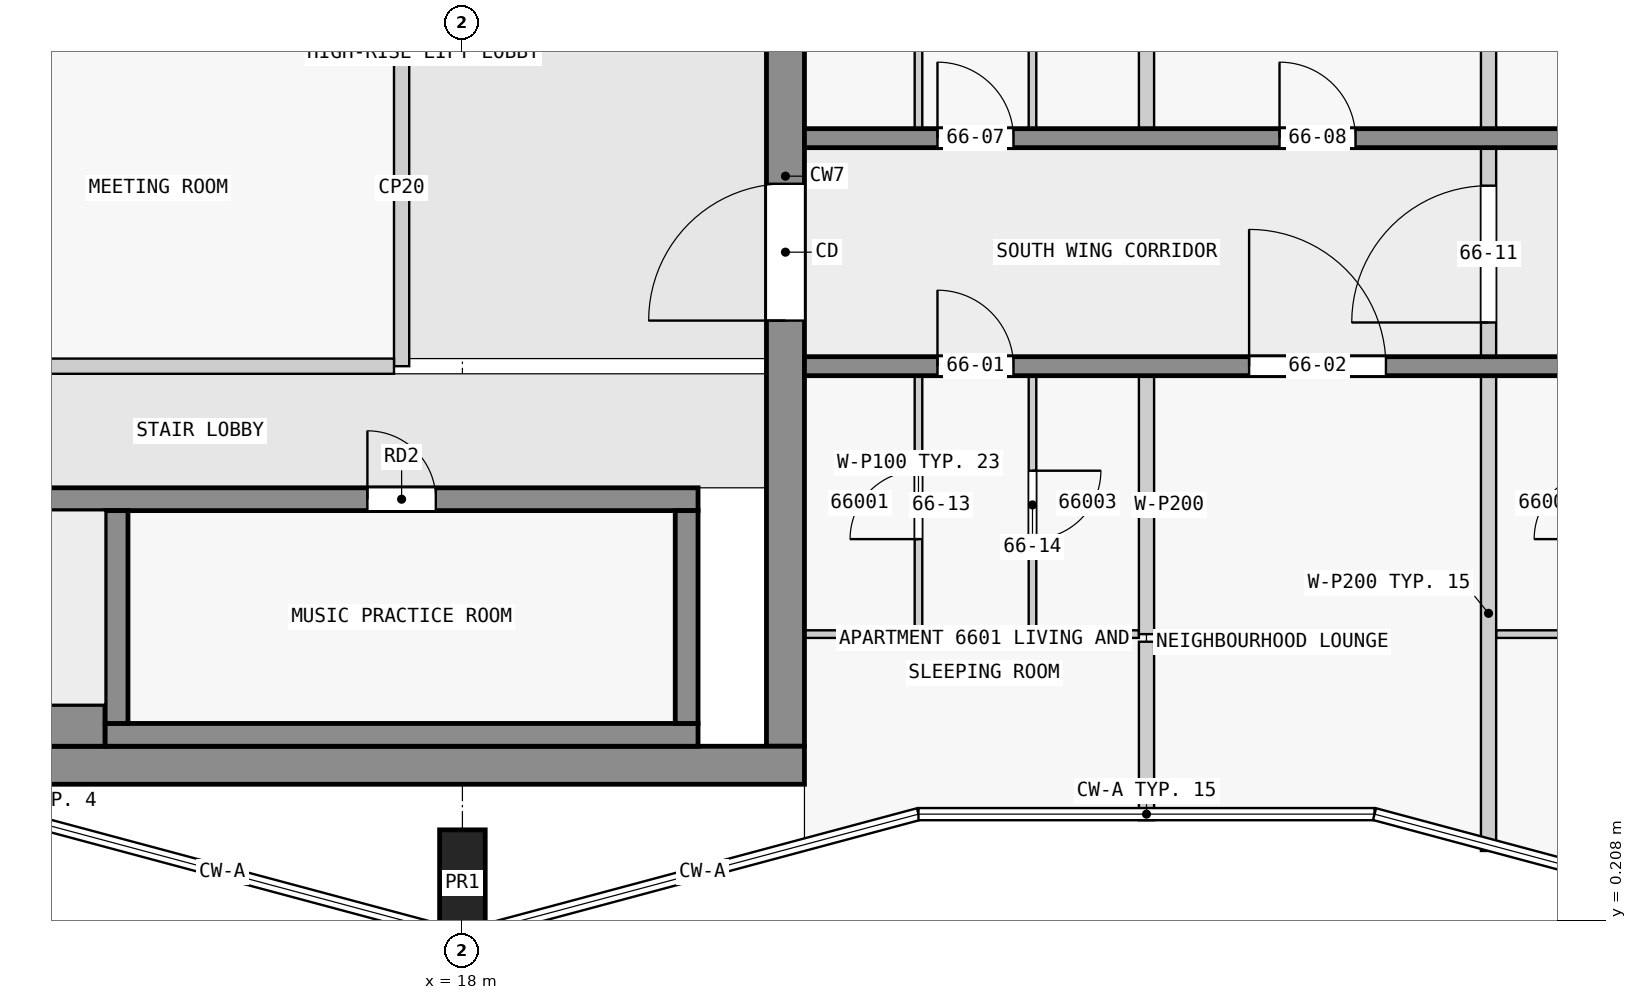
"""IFC4 building model, lengths in metres.
Left out: names, types, materials, properties, quantities, classifications, styles, units other than length and angle.
Written with IfcOpenShell. Run it as: python <this file> out.ifc"""

import sys

from ifc_helpers import new_model, si_unit, direction, frame, frame_2d, origin, origin_2d, place, context, subcontext, project, spatial, rectangle, extrude, element, fill, save


model = new_model("IFC4")
c1 = context("Model", 3, precision=1e-05, world=origin(), true_north=direction((0.0, 1.0)))
c2 = subcontext(c1, "Body", "Model", "MODEL_VIEW")
j1 = project(units=[si_unit("LENGTHUNIT", "METRE"), si_unit("PLANEANGLEUNIT", "RADIAN")], contexts=[c1])
p1 = place(None, origin())
s1 = spatial("IfcSite", under=j1, at=p1, CompositionType="ELEMENT")
p2 = place(p1, origin())
s2 = spatial("IfcBuilding", under=s1, at=p2, CompositionType="ELEMENT")
p3 = place(p2, frame((0.0, 0.0, 252.9)))
s3 = spatial("IfcBuildingStorey", under=s2, at=p3, CompositionType="ELEMENT", Elevation=252.9)
p4 = place(p3, frame((18.0, 0.7, 0.0), z_axis=(0.0, 0.0, 1.0), x_axis=(1.0, 0.0, 0.0)))
e1 = element("IfcColumn", 1, at=p4, inside=s3, PredefinedType="COLUMN", context=c2, shape_type="SweptSolid", body=[
    extrude(rectangle(XDim=0.6, YDim=1.4, at=origin_2d()), origin(), (0.0, 0.0, 1.0), 3.5),
])
p5 = place(p3, frame((1.8, 2.25, 0.0), z_axis=(0.0, 0.0, 1.0), x_axis=(1.0, 0.0, 0.0)))
e2 = element("IfcWall", 2, at=p5, inside=s3, PredefinedType="SHEAR", context=c2, shape_type="SweptSolid", body=[
    extrude(rectangle(XDim=20.7, YDim=0.5, at=frame_2d((10.35, 0.0))), origin(), (0.0, 0.0, 1.0), 3.25),
])
p6 = place(p3, frame((22.25, 2.5, 0.0), z_axis=(0.0, 0.0, 1.0), x_axis=(0.0, 1.0, 0.0)))
e3 = element("IfcWall", 3, at=p6, inside=s3, PredefinedType="SHEAR", context=c2, shape_type="SweptSolid", body=[
    extrude(rectangle(XDim=15.0, YDim=0.5, at=frame_2d((7.5, 0.0))), origin(), (0.0, 0.0, 1.0), 3.25),
])
p7 = place(p6, frame((5.6, 0.0, 0.0)))
e4 = element("IfcOpeningElement", 4, at=p7, cuts=e3, PredefinedType="OPENING", context=c2, shape_type="SweptSolid", body=[
    extrude(rectangle(XDim=1.8, YDim=2.1, at=frame_2d((0.9, 1.05))), frame((0.0, 0.26, 0.0), z_axis=(0.0, -1.0, 0.0), x_axis=(1.0, 0.0, 0.0)), (0.0, 0.0, 1.0), 0.52),
])
p8 = place(p3, frame((6.9, 2.775, 0.0), z_axis=(0.0, 0.0, 1.0), x_axis=(1.0, 0.0, 0.0)))
e5 = element("IfcWall", 5, at=p8, inside=s3, PredefinedType="SHEAR", context=c2, shape_type="SweptSolid", body=[
    extrude(rectangle(XDim=6.4, YDim=0.55, at=frame_2d((3.2, 0.0))), origin(), (0.0, 0.0, 1.0), 3.25),
])
p9 = place(p3, frame((13.3, 2.65, 0.0), z_axis=(0.0, 0.0, 1.0), x_axis=(1.0, 0.0, 0.0)))
e6 = element("IfcWall", 6, at=p9, inside=s3, PredefinedType="SHEAR", context=c2, shape_type="SweptSolid", body=[
    extrude(rectangle(XDim=7.8, YDim=0.3, at=frame_2d((3.9, 0.0))), origin(), (0.0, 0.0, 1.0), 3.25),
])
for number, where, z_axis, x_axis in (
    (7, (13.45, 2.8, 0.0), (0.0, 0.0, 1.0), (0.0, 1.0, 0.0)),
    (8, (20.95, 2.8, 0.0), (0.0, 0.0, 1.0), (0.0, 1.0, 0.0)),
):
    element("IfcWall", number, at=place(p3, frame(where, z_axis=z_axis, x_axis=x_axis)), inside=s3, PredefinedType="SHEAR", context=c2, shape_type="SweptSolid", body=[
        extrude(rectangle(XDim=2.8, YDim=0.3, at=frame_2d((1.4, 0.0))), origin(), (0.0, 0.0, 1.0), 3.25),
    ])
p10 = place(p3, frame((2.3, 5.75, 0.0), z_axis=(0.0, 0.0, 1.0), x_axis=(1.0, 0.0, 0.0)))
e9 = element("IfcWall", 9, at=p10, inside=s3, PredefinedType="SHEAR", context=c2, shape_type="SweptSolid", body=[
    extrude(rectangle(XDim=18.8, YDim=0.3, at=frame_2d((9.4, 0.0))), origin(), (0.0, 0.0, 1.0), 3.25),
])
p11 = place(p10, frame((4.65, 0.0, 0.0)))
e10 = element("IfcOpeningElement", 10, at=p11, cuts=e9, PredefinedType="OPENING", context=c2, shape_type="SweptSolid", body=[
    extrude(rectangle(XDim=1.1, YDim=2.1, at=frame_2d((0.55, 1.05))), frame((0.0, 0.16, 0.0), z_axis=(0.0, -1.0, 0.0), x_axis=(1.0, 0.0, 0.0)), (0.0, 0.0, 1.0), 0.32),
])
p12 = place(p10, frame((0.45, 0.0, 0.0)))
e11 = element("IfcOpeningElement", 11, at=p12, cuts=e9, PredefinedType="OPENING", context=c2, shape_type="SweptSolid", body=[
    extrude(rectangle(XDim=1.1, YDim=2.1, at=frame_2d((0.55, 1.05))), frame((0.0, 0.16, 0.0), z_axis=(0.0, -1.0, 0.0), x_axis=(1.0, 0.0, 0.0)), (0.0, 0.0, 1.0), 0.32),
])
p13 = place(p10, frame((2.75, 0.0, 0.0)))
e12 = element("IfcOpeningElement", 12, at=p13, cuts=e9, PredefinedType="OPENING", context=c2, shape_type="SweptSolid", body=[
    extrude(rectangle(XDim=1.1, YDim=2.1, at=frame_2d((0.55, 1.05))), frame((0.0, 0.16, 0.0), z_axis=(0.0, -1.0, 0.0), x_axis=(1.0, 0.0, 0.0)), (0.0, 0.0, 1.0), 0.32),
])
p14 = place(p10, frame((14.45, 0.0, 0.0)))
e13 = element("IfcOpeningElement", 13, at=p14, cuts=e9, PredefinedType="OPENING", context=c2, shape_type="SweptSolid", body=[
    extrude(rectangle(XDim=0.9, YDim=2.1, at=frame_2d((0.45, 1.05))), frame((0.0, 0.16, 0.0), z_axis=(0.0, -1.0, 0.0), x_axis=(1.0, 0.0, 0.0)), (0.0, 0.0, 1.0), 0.32),
])
p15 = place(p3, frame((22.5, 7.5, 0.0), z_axis=(0.0, 0.0, 1.0), x_axis=(1.0, 0.0, 0.0)))
e14 = element("IfcWall", 14, at=p15, inside=s3, PredefinedType="SHEAR", context=c2, shape_type="SweptSolid", body=[
    extrude(rectangle(XDim=22.5, YDim=0.25, at=frame_2d((11.25, 0.0))), origin(), (0.0, 0.0, 1.0), 3.25),
])
p16 = place(p15, frame((1.75, 0.0, 0.0)))
e15 = element("IfcOpeningElement", 15, at=p16, cuts=e14, PredefinedType="OPENING", context=c2, shape_type="SweptSolid", body=[
    extrude(rectangle(XDim=1.0, YDim=2.1, at=frame_2d((0.5, 1.05))), frame((0.0, 0.135, 0.0), z_axis=(0.0, -1.0, 0.0), x_axis=(1.0, 0.0, 0.0)), (0.0, 0.0, 1.0), 0.27),
])
p17 = place(p15, frame((5.85, 0.0, 0.0)))
e16 = element("IfcOpeningElement", 16, at=p17, cuts=e14, PredefinedType="OPENING", context=c2, shape_type="SweptSolid", body=[
    extrude(rectangle(XDim=1.8, YDim=2.1, at=frame_2d((0.9, 1.05))), frame((0.0, 0.135, 0.0), z_axis=(0.0, -1.0, 0.0), x_axis=(1.0, 0.0, 0.0)), (0.0, 0.0, 1.0), 0.27),
])
p18 = place(p15, frame((10.75, 0.0, 0.0)))
e17 = element("IfcOpeningElement", 17, at=p18, cuts=e14, PredefinedType="OPENING", context=c2, shape_type="SweptSolid", body=[
    extrude(rectangle(XDim=1.0, YDim=2.1, at=frame_2d((0.5, 1.05))), frame((0.0, 0.135, 0.0), z_axis=(0.0, -1.0, 0.0), x_axis=(1.0, 0.0, 0.0)), (0.0, 0.0, 1.0), 0.27),
])
p19 = place(p15, frame((15.25, 0.0, 0.0)))
e18 = element("IfcOpeningElement", 18, at=p19, cuts=e14, PredefinedType="OPENING", context=c2, shape_type="SweptSolid", body=[
    extrude(rectangle(XDim=1.0, YDim=2.1, at=frame_2d((0.5, 1.05))), frame((0.0, 0.135, 0.0), z_axis=(0.0, -1.0, 0.0), x_axis=(1.0, 0.0, 0.0)), (0.0, 0.0, 1.0), 0.27),
])
p20 = place(p15, frame((18.75, 0.0, 0.0)))
e19 = element("IfcOpeningElement", 19, at=p20, cuts=e14, PredefinedType="OPENING", context=c2, shape_type="SweptSolid", body=[
    extrude(rectangle(XDim=0.9, YDim=2.1, at=frame_2d((0.45, 1.05))), frame((0.0, 0.135, 0.0), z_axis=(0.0, -1.0, 0.0), x_axis=(1.0, 0.0, 0.0)), (0.0, 0.0, 1.0), 0.27),
])
p21 = place(p15, frame((20.95, 0.0, 0.0)))
e20 = element("IfcOpeningElement", 20, at=p21, cuts=e14, PredefinedType="OPENING", context=c2, shape_type="SweptSolid", body=[
    extrude(rectangle(XDim=1.0, YDim=2.1, at=frame_2d((0.5, 1.05))), frame((0.0, 0.135, 0.0), z_axis=(0.0, -1.0, 0.0), x_axis=(1.0, 0.0, 0.0)), (0.0, 0.0, 1.0), 0.27),
])
p22 = place(p3, frame((22.5, 10.5, 0.0), z_axis=(0.0, 0.0, 1.0), x_axis=(1.0, 0.0, 0.0)))
e21 = element("IfcWall", 21, at=p22, inside=s3, PredefinedType="SHEAR", context=c2, shape_type="SweptSolid", body=[
    extrude(rectangle(XDim=22.5, YDim=0.25, at=frame_2d((11.25, 0.0))), origin(), (0.0, 0.0, 1.0), 3.25),
])
p23 = place(p22, frame((1.75, 0.0, 0.0)))
e22 = element("IfcOpeningElement", 22, at=p23, cuts=e21, PredefinedType="OPENING", context=c2, shape_type="SweptSolid", body=[
    extrude(rectangle(XDim=1.0, YDim=2.1, at=frame_2d((0.5, 1.05))), frame((0.0, 0.135, 0.0), z_axis=(0.0, -1.0, 0.0), x_axis=(1.0, 0.0, 0.0)), (0.0, 0.0, 1.0), 0.27),
])
p24 = place(p22, frame((6.25, 0.0, 0.0)))
e23 = element("IfcOpeningElement", 23, at=p24, cuts=e21, PredefinedType="OPENING", context=c2, shape_type="SweptSolid", body=[
    extrude(rectangle(XDim=1.0, YDim=2.1, at=frame_2d((0.5, 1.05))), frame((0.0, 0.135, 0.0), z_axis=(0.0, -1.0, 0.0), x_axis=(1.0, 0.0, 0.0)), (0.0, 0.0, 1.0), 0.27),
])
p25 = place(p22, frame((10.75, 0.0, 0.0)))
e24 = element("IfcOpeningElement", 24, at=p25, cuts=e21, PredefinedType="OPENING", context=c2, shape_type="SweptSolid", body=[
    extrude(rectangle(XDim=1.0, YDim=2.1, at=frame_2d((0.5, 1.05))), frame((0.0, 0.135, 0.0), z_axis=(0.0, -1.0, 0.0), x_axis=(1.0, 0.0, 0.0)), (0.0, 0.0, 1.0), 0.27),
])
p26 = place(p22, frame((16.85, 0.0, 0.0)))
e25 = element("IfcOpeningElement", 25, at=p26, cuts=e21, PredefinedType="OPENING", context=c2, shape_type="SweptSolid", body=[
    extrude(rectangle(XDim=1.0, YDim=2.1, at=frame_2d((0.5, 1.05))), frame((0.0, 0.135, 0.0), z_axis=(0.0, -1.0, 0.0), x_axis=(1.0, 0.0, 0.0)), (0.0, 0.0, 1.0), 0.27),
])
p27 = place(p3, frame((10.9, 7.5, 0.0), z_axis=(0.0, 0.0, 1.0), x_axis=(1.0, 0.0, 0.0)))
e26 = element("IfcWall", 26, at=p27, inside=s3, PredefinedType="PARTITIONING", context=c2, shape_type="SweptSolid", body=[
    extrude(rectangle(XDim=6.2, YDim=0.2, at=frame_2d((3.1, 0.0))), origin(), (0.0, 0.0, 1.0), 3.25),
])
p28 = place(p3, frame((17.2, 7.5, 0.0), z_axis=(0.0, 0.0, 1.0), x_axis=(0.0, 1.0, 0.0)))
e27 = element("IfcWall", 27, at=p28, inside=s3, PredefinedType="PARTITIONING", context=c2, shape_type="SweptSolid", body=[
    extrude(rectangle(XDim=4.7, YDim=0.2, at=frame_2d((2.35, 0.0))), origin(), (0.0, 0.0, 1.0), 3.25),
])
p29 = place(p3, frame((22.5, 3.975, 0.0), z_axis=(0.0, 0.0, 1.0), x_axis=(1.0, 0.0, 0.0)))
e28 = element("IfcWall", 28, at=p29, inside=s3, PredefinedType="PARTITIONING", context=c2, shape_type="SweptSolid", body=[
    extrude(rectangle(XDim=1.45, YDim=0.1, at=frame_2d((0.725, 0.0))), origin(), (0.0, 0.0, 1.0), 3.25),
])
for number, where, z_axis, x_axis in (
    (29, (25.55, 3.975, 0.0), (0.0, 0.0, 1.0), (1.0, 0.0, 0.0)),
    (30, (31.6, 3.975, 0.0), (0.0, 0.0, 1.0), (1.0, 0.0, 0.0)),
):
    element("IfcWall", number, at=place(p3, frame(where, z_axis=z_axis, x_axis=x_axis)), inside=s3, PredefinedType="PARTITIONING", context=c2, shape_type="SweptSolid", body=[
        extrude(rectangle(XDim=1.35, YDim=0.1, at=frame_2d((0.675, 0.0))), origin(), (0.0, 0.0, 1.0), 3.25),
    ])
p30 = place(p3, frame((24.0, 3.975, 0.0), z_axis=(0.0, 0.0, 1.0), x_axis=(0.0, 1.0, 0.0)))
e31 = element("IfcWall", 31, at=p30, inside=s3, PredefinedType="PARTITIONING", context=c2, shape_type="SweptSolid", body=[
    extrude(rectangle(XDim=3.4, YDim=0.1, at=frame_2d((1.7, 0.0))), origin(), (0.0, 0.0, 1.0), 3.25),
])
p31 = place(p30, frame((1.25, 0.0, 0.0)))
e32 = element("IfcOpeningElement", 32, at=p31, cuts=e31, PredefinedType="OPENING", context=c2, shape_type="SweptSolid", body=[
    extrude(rectangle(XDim=0.9, YDim=2.1, at=frame_2d((0.45, 1.05))), frame((0.0, 0.06, 0.0), z_axis=(0.0, -1.0, 0.0), x_axis=(1.0, 0.0, 0.0)), (0.0, 0.0, 1.0), 0.12),
])
p32 = place(p3, frame((24.0, 10.625, 0.0), z_axis=(0.0, 0.0, 1.0), x_axis=(0.0, 1.0, 0.0)))
e33 = element("IfcWall", 33, at=p32, inside=s3, PredefinedType="PARTITIONING", context=c2, shape_type="SweptSolid", body=[
    extrude(rectangle(XDim=3.4, YDim=0.1, at=frame_2d((1.7, 0.0))), origin(), (0.0, 0.0, 1.0), 3.25),
])
p33 = place(p32, frame((1.25, 0.0, 0.0)))
e34 = element("IfcOpeningElement", 34, at=p33, cuts=e33, PredefinedType="OPENING", context=c2, shape_type="SweptSolid", body=[
    extrude(rectangle(XDim=0.9, YDim=2.1, at=frame_2d((0.45, 1.05))), frame((0.0, 0.06, 0.0), z_axis=(0.0, -1.0, 0.0), x_axis=(1.0, 0.0, 0.0)), (0.0, 0.0, 1.0), 0.12),
])
p34 = place(p3, frame((25.5, 7.375, 0.0), z_axis=(0.0, 0.0, 1.0), x_axis=(0.0, -1.0, 0.0)))
e35 = element("IfcWall", 35, at=p34, inside=s3, PredefinedType="PARTITIONING", context=c2, shape_type="SweptSolid", body=[
    extrude(rectangle(XDim=3.4, YDim=0.1, at=frame_2d((1.7, 0.0))), origin(), (0.0, 0.0, 1.0), 3.25),
])
p35 = place(p34, frame((1.25, 0.0, 0.0)))
e36 = element("IfcOpeningElement", 36, at=p35, cuts=e35, PredefinedType="OPENING", context=c2, shape_type="SweptSolid", body=[
    extrude(rectangle(XDim=0.9, YDim=2.1, at=frame_2d((0.45, 1.05))), frame((0.0, 0.06, 0.0), z_axis=(0.0, -1.0, 0.0), x_axis=(1.0, 0.0, 0.0)), (0.0, 0.0, 1.0), 0.12),
])
p36 = place(p3, frame((25.5, 14.025, 0.0), z_axis=(0.0, 0.0, 1.0), x_axis=(0.0, -1.0, 0.0)))
e37 = element("IfcWall", 37, at=p36, inside=s3, PredefinedType="PARTITIONING", context=c2, shape_type="SweptSolid", body=[
    extrude(rectangle(XDim=3.4, YDim=0.1, at=frame_2d((1.7, 0.0))), origin(), (0.0, 0.0, 1.0), 3.25),
])
p37 = place(p36, frame((1.25, 0.0, 0.0)))
e38 = element("IfcOpeningElement", 38, at=p37, cuts=e37, PredefinedType="OPENING", context=c2, shape_type="SweptSolid", body=[
    extrude(rectangle(XDim=0.9, YDim=2.1, at=frame_2d((0.45, 1.05))), frame((0.0, 0.06, 0.0), z_axis=(0.0, -1.0, 0.0), x_axis=(1.0, 0.0, 0.0)), (0.0, 0.0, 1.0), 0.12),
])
p38 = place(p3, frame((27.0, 3.875, 0.0), z_axis=(0.0, 0.0, 1.0), x_axis=(0.0, -1.0, 0.0)))
e39 = element("IfcWall", 39, at=p38, inside=s3, PredefinedType="PARTITIONING", context=c2, shape_type="SweptSolid", body=[
    extrude(rectangle(XDim=2.348, YDim=0.2, at=frame_2d((1.174, 0.0))), origin(), (0.0, 0.0, 1.0), 3.25),
])
for number, where, z_axis, x_axis in (
    (40, (27.0, 3.975, 0.0), (0.0, 0.0, 1.0), (0.0, 1.0, 0.0)),
    (41, (27.0, 10.625, 0.0), (0.0, 0.0, 1.0), (0.0, 1.0, 0.0)),
):
    element("IfcWall", number, at=place(p3, frame(where, z_axis=z_axis, x_axis=x_axis)), inside=s3, PredefinedType="PARTITIONING", context=c2, shape_type="SweptSolid", body=[
        extrude(rectangle(XDim=3.4, YDim=0.2, at=frame_2d((1.7, 0.0))), origin(), (0.0, 0.0, 1.0), 3.25),
    ])
for number, where, z_axis, x_axis in (
    (42, (31.5, 1.122, 0.0), (0.0, 0.0, 1.0), (0.0, 1.0, 0.0)),
    (43, (31.5, 10.625, 0.0), (0.0, 0.0, 1.0), (0.0, 1.0, 0.0)),
):
    element("IfcWall", number, at=place(p3, frame(where, z_axis=z_axis, x_axis=x_axis)), inside=s3, PredefinedType="PARTITIONING", context=c2, shape_type="SweptSolid", body=[
        extrude(rectangle(XDim=6.253, YDim=0.2, at=frame_2d((3.126, 0.0))), origin(), (0.0, 0.0, 1.0), 3.25),
    ])
p39 = place(p3, frame((31.5, 7.475, 0.0), z_axis=(0.0, 0.0, 1.0), x_axis=(0.0, 1.0, 0.0)))
e44 = element("IfcWall", 44, at=p39, inside=s3, PredefinedType="PARTITIONING", context=c2, shape_type="SweptSolid", body=[
    extrude(rectangle(XDim=3.05, YDim=0.2, at=frame_2d((1.525, 0.0))), origin(), (0.0, 0.0, 1.0), 3.25),
])
p40 = place(p39, frame((0.6, 0.0, 0.0)))
e45 = element("IfcOpeningElement", 45, at=p40, cuts=e44, PredefinedType="OPENING", context=c2, shape_type="SweptSolid", body=[
    extrude(rectangle(XDim=1.8, YDim=2.1, at=frame_2d((0.9, 1.05))), frame((0.0, 0.11, 0.0), z_axis=(0.0, -1.0, 0.0), x_axis=(1.0, 0.0, 0.0)), (0.0, 0.0, 1.0), 0.22),
])
p41 = place(p7, origin())
e46 = element("IfcDoor", 46, at=p41, inside=s3, OperationType="DOUBLE_DOOR_SINGLE_SWING", PredefinedType="DOOR", context=c2, shape_type="SweptSolid", body=[
    extrude(rectangle(XDim=1.8, YDim=2.1, at=frame_2d((0.9, 1.05))), frame((0.0, 0.025, 0.0), z_axis=(0.0, -1.0, 0.0), x_axis=(1.0, 0.0, 0.0)), (0.0, 0.0, 1.0), 0.05),
])
fill(e4, e46)
p42 = place(p14, origin())
e47 = element("IfcDoor", 47, at=p42, inside=s3, OperationType="SINGLE_SWING_LEFT", PredefinedType="DOOR", context=c2, shape_type="SweptSolid", body=[
    extrude(rectangle(XDim=0.9, YDim=2.1, at=frame_2d((0.45, 1.05))), frame((0.0, 0.025, 0.0), z_axis=(0.0, -1.0, 0.0), x_axis=(1.0, 0.0, 0.0)), (0.0, 0.0, 1.0), 0.05),
])
fill(e13, e47)
p43 = place(p16, origin())
e48 = element("IfcDoor", 48, at=p43, inside=s3, OperationType="SINGLE_SWING_LEFT", PredefinedType="DOOR", context=c2, shape_type="SweptSolid", body=[
    extrude(rectangle(XDim=1.0, YDim=2.1, at=frame_2d((0.5, 1.05))), frame((0.0, 0.025, 0.0), z_axis=(0.0, -1.0, 0.0), x_axis=(1.0, 0.0, 0.0)), (0.0, 0.0, 1.0), 0.05),
])
fill(e15, e48)
p44 = place(p17, origin())
e49 = element("IfcDoor", 49, at=p44, inside=s3, OperationType="SINGLE_SWING_LEFT", PredefinedType="DOOR", context=c2, shape_type="SweptSolid", body=[
    extrude(rectangle(XDim=1.8, YDim=2.1, at=frame_2d((0.9, 1.05))), frame((0.0, 0.025, 0.0), z_axis=(0.0, -1.0, 0.0), x_axis=(1.0, 0.0, 0.0)), (0.0, 0.0, 1.0), 0.05),
])
fill(e16, e49)
p45 = place(p23, origin())
e50 = element("IfcDoor", 50, at=p45, inside=s3, OperationType="SINGLE_SWING_LEFT", PredefinedType="DOOR", context=c2, shape_type="SweptSolid", body=[
    extrude(rectangle(XDim=1.0, YDim=2.1, at=frame_2d((0.5, 1.05))), frame((0.0, 0.025, 0.0), z_axis=(0.0, -1.0, 0.0), x_axis=(1.0, 0.0, 0.0)), (0.0, 0.0, 1.0), 0.05),
])
fill(e22, e50)
p46 = place(p24, origin())
e51 = element("IfcDoor", 51, at=p46, inside=s3, OperationType="SINGLE_SWING_LEFT", PredefinedType="DOOR", context=c2, shape_type="SweptSolid", body=[
    extrude(rectangle(XDim=1.0, YDim=2.1, at=frame_2d((0.5, 1.05))), frame((0.0, 0.025, 0.0), z_axis=(0.0, -1.0, 0.0), x_axis=(1.0, 0.0, 0.0)), (0.0, 0.0, 1.0), 0.05),
])
fill(e23, e51)
p47 = place(p40, origin())
e52 = element("IfcDoor", 52, at=p47, inside=s3, OperationType="SINGLE_SWING_LEFT", PredefinedType="DOOR", context=c2, shape_type="SweptSolid", body=[
    extrude(rectangle(XDim=1.8, YDim=2.1, at=frame_2d((0.9, 1.05))), frame((0.0, 0.025, 0.0), z_axis=(0.0, -1.0, 0.0), x_axis=(1.0, 0.0, 0.0)), (0.0, 0.0, 1.0), 0.05),
])
fill(e45, e52)
p48 = place(p31, origin())
e53 = element("IfcDoor", 53, at=p48, inside=s3, OperationType="SINGLE_SWING_LEFT", PredefinedType="DOOR", context=c2, shape_type="SweptSolid", body=[
    extrude(rectangle(XDim=0.9, YDim=2.1, at=frame_2d((0.45, 1.05))), frame((0.0, 0.025, 0.0), z_axis=(0.0, -1.0, 0.0), x_axis=(1.0, 0.0, 0.0)), (0.0, 0.0, 1.0), 0.05),
])
fill(e32, e53)
p49 = place(p35, origin())
e54 = element("IfcDoor", 54, at=p49, inside=s3, OperationType="SINGLE_SWING_LEFT", PredefinedType="DOOR", context=c2, shape_type="SweptSolid", body=[
    extrude(rectangle(XDim=0.9, YDim=2.1, at=frame_2d((0.45, 1.05))), frame((0.0, 0.025, 0.0), z_axis=(0.0, -1.0, 0.0), x_axis=(1.0, 0.0, 0.0)), (0.0, 0.0, 1.0), 0.05),
])
fill(e36, e54)
save(model, sys.argv[1])
